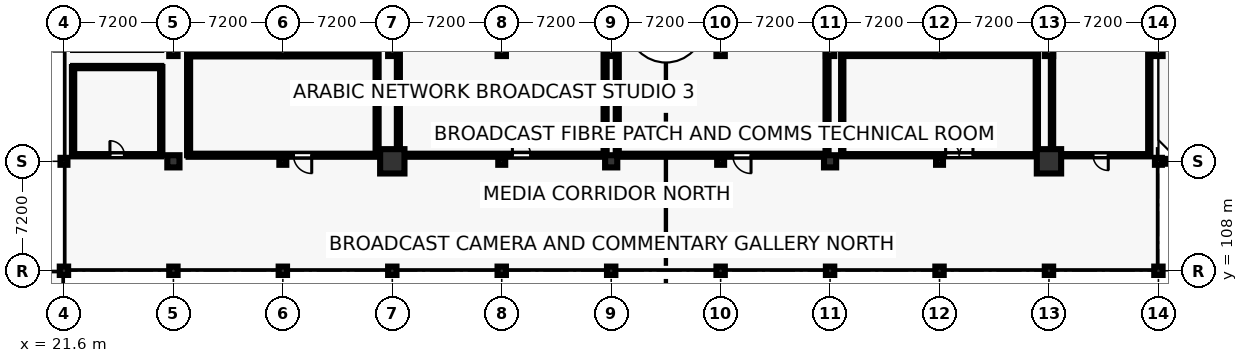
"""IFC4 building model, lengths in metres.
Left out: names, types, materials, properties, quantities, classifications, styles, units other than length and angle.
Written with IfcOpenShell. Run it as: python <this file> out.ifc"""

import sys

from ifc_helpers import new_model, si_unit, direction, frame, frame_2d, origin, origin_2d, place, context, subcontext, project, spatial, rectangle, circle, hollow_circle, extrude, element, fill, save


model = new_model("IFC4")
c1 = context("Model", 3, precision=1e-05, world=origin(), true_north=direction((0.0, 1.0)))
c2 = subcontext(c1, "Body", "Model", "MODEL_VIEW")
j1 = project(units=[si_unit("LENGTHUNIT", "METRE"), si_unit("PLANEANGLEUNIT", "RADIAN")], contexts=[c1])
p1 = place(None, origin())
s1 = spatial("IfcSite", under=j1, at=p1, CompositionType="ELEMENT")
p2 = place(p1, origin())
s2 = spatial("IfcBuilding", under=s1, at=p2, CompositionType="ELEMENT")
p3 = place(p2, frame((0.0, 0.0, 18.6)))
s3 = spatial("IfcBuildingStorey", under=s2, at=p3, CompositionType="ELEMENT", Elevation=18.6)
p4 = place(p3, frame((21.6, 108.0, 0.0), z_axis=(0.0, 0.0, 1.0), x_axis=(1.0, 0.0, 0.0)))
e1 = element("IfcColumn", 1, at=p4, inside=s3, PredefinedType="COLUMN", context=c2, shape_type="SweptSolid", body=[
    extrude(rectangle(XDim=0.55, YDim=0.55, at=origin_2d()), origin(), (0.0, 0.0, 1.0), 4.4),
])
p5 = place(p3, frame((21.6, 115.2, 0.0), z_axis=(0.0, 0.0, 1.0), x_axis=(1.0, 0.0, 0.0)))
e2 = element("IfcColumn", 2, at=p5, inside=s3, PredefinedType="COLUMN", context=c2, shape_type="SweptSolid", body=[
    extrude(hollow_circle(Radius=0.229, WallThickness=0.02, at=origin_2d()), origin(), (0.0, 0.0, 1.0), 4.4),
])
p6 = place(p3, frame((28.8, 108.0, 0.0), z_axis=(0.0, 0.0, 1.0), x_axis=(1.0, 0.0, 0.0)))
e3 = element("IfcColumn", 3, at=p6, inside=s3, PredefinedType="COLUMN", context=c2, shape_type="SweptSolid", body=[
    extrude(rectangle(XDim=0.55, YDim=0.55, at=origin_2d()), origin(), (0.0, 0.0, 1.0), 4.4),
])
p7 = place(p3, frame((28.8, 115.2, 0.0), z_axis=(0.0, 0.0, 1.0), x_axis=(1.0, 0.0, 0.0)))
e4 = element("IfcColumn", 4, at=p7, inside=s3, PredefinedType="COLUMN", context=c2, shape_type="SweptSolid", body=[
    extrude(circle(Radius=0.4, at=origin_2d()), origin(), (0.0, 0.0, 1.0), 4.4),
])
for number, where, z_axis, x_axis in (
    (5, (28.8, 122.4, 0.0), (0.0, 0.0, 1.0), (1.0, 0.0, 0.0)),
    (6, (36.0, 108.0, 0.0), (0.0, 0.0, 1.0), (1.0, 0.0, 0.0)),
):
    element("IfcColumn", number, at=place(p3, frame(where, z_axis=z_axis, x_axis=x_axis)), inside=s3, PredefinedType="COLUMN", context=c2, shape_type="SweptSolid", body=[
        extrude(rectangle(XDim=0.55, YDim=0.55, at=origin_2d()), origin(), (0.0, 0.0, 1.0), 4.4),
    ])
p8 = place(p3, frame((36.0, 115.2, 0.0), z_axis=(0.0, 0.0, 1.0), x_axis=(1.0, 0.0, 0.0)))
e7 = element("IfcColumn", 7, at=p8, inside=s3, PredefinedType="COLUMN", context=c2, shape_type="SweptSolid", body=[
    extrude(hollow_circle(Radius=0.229, WallThickness=0.02, at=origin_2d()), origin(), (0.0, 0.0, 1.0), 4.4),
])
for number, where, z_axis, x_axis in (
    (8, (36.0, 122.4, 0.0), (0.0, 0.0, 1.0), (1.0, 0.0, 0.0)),
    (9, (43.2, 108.0, 0.0), (0.0, 0.0, 1.0), (1.0, 0.0, 0.0)),
):
    element("IfcColumn", number, at=place(p3, frame(where, z_axis=z_axis, x_axis=x_axis)), inside=s3, PredefinedType="COLUMN", context=c2, shape_type="SweptSolid", body=[
        extrude(rectangle(XDim=0.55, YDim=0.55, at=origin_2d()), origin(), (0.0, 0.0, 1.0), 4.4),
    ])
p9 = place(p3, frame((43.2, 115.2, 0.0), z_axis=(0.0, 0.0, 1.0), x_axis=(1.0, 0.0, 0.0)))
e10 = element("IfcColumn", 10, at=p9, inside=s3, PredefinedType="COLUMN", context=c2, shape_type="SweptSolid", body=[
    extrude(circle(Radius=0.8, at=origin_2d()), origin(), (0.0, 0.0, 1.0), 4.4),
])
for number, where, z_axis, x_axis in (
    (11, (43.2, 122.4, 0.0), (0.0, 0.0, 1.0), (1.0, 0.0, 0.0)),
    (12, (50.4, 108.0, 0.0), (0.0, 0.0, 1.0), (1.0, 0.0, 0.0)),
):
    element("IfcColumn", number, at=place(p3, frame(where, z_axis=z_axis, x_axis=x_axis)), inside=s3, PredefinedType="COLUMN", context=c2, shape_type="SweptSolid", body=[
        extrude(rectangle(XDim=0.55, YDim=0.55, at=origin_2d()), origin(), (0.0, 0.0, 1.0), 4.4),
    ])
p10 = place(p3, frame((50.4, 115.2, 0.0), z_axis=(0.0, 0.0, 1.0), x_axis=(1.0, 0.0, 0.0)))
e13 = element("IfcColumn", 13, at=p10, inside=s3, PredefinedType="COLUMN", context=c2, shape_type="SweptSolid", body=[
    extrude(hollow_circle(Radius=0.229, WallThickness=0.02, at=origin_2d()), origin(), (0.0, 0.0, 1.0), 4.4),
])
for number, where, z_axis, x_axis in (
    (14, (50.4, 122.4, 0.0), (0.0, 0.0, 1.0), (1.0, 0.0, 0.0)),
    (15, (57.6, 108.0, 0.0), (0.0, 0.0, 1.0), (1.0, 0.0, 0.0)),
):
    element("IfcColumn", number, at=place(p3, frame(where, z_axis=z_axis, x_axis=x_axis)), inside=s3, PredefinedType="COLUMN", context=c2, shape_type="SweptSolid", body=[
        extrude(rectangle(XDim=0.55, YDim=0.55, at=origin_2d()), origin(), (0.0, 0.0, 1.0), 4.4),
    ])
p11 = place(p3, frame((57.6, 115.2, 0.0), z_axis=(0.0, 0.0, 1.0), x_axis=(1.0, 0.0, 0.0)))
e16 = element("IfcColumn", 16, at=p11, inside=s3, PredefinedType="COLUMN", context=c2, shape_type="SweptSolid", body=[
    extrude(circle(Radius=0.4, at=origin_2d()), origin(), (0.0, 0.0, 1.0), 4.4),
])
for number, where, z_axis, x_axis in (
    (17, (57.6, 122.4, 0.0), (0.0, 0.0, 1.0), (1.0, 0.0, 0.0)),
    (18, (64.8, 108.0, 0.0), (0.0, 0.0, 1.0), (1.0, 0.0, 0.0)),
):
    element("IfcColumn", number, at=place(p3, frame(where, z_axis=z_axis, x_axis=x_axis)), inside=s3, PredefinedType="COLUMN", context=c2, shape_type="SweptSolid", body=[
        extrude(rectangle(XDim=0.55, YDim=0.55, at=origin_2d()), origin(), (0.0, 0.0, 1.0), 4.4),
    ])
p12 = place(p3, frame((64.8, 115.2, 0.0), z_axis=(0.0, 0.0, 1.0), x_axis=(1.0, 0.0, 0.0)))
e19 = element("IfcColumn", 19, at=p12, inside=s3, PredefinedType="COLUMN", context=c2, shape_type="SweptSolid", body=[
    extrude(hollow_circle(Radius=0.229, WallThickness=0.02, at=origin_2d()), origin(), (0.0, 0.0, 1.0), 4.4),
])
for number, where, z_axis, x_axis in (
    (20, (64.8, 122.4, 0.0), (0.0, 0.0, 1.0), (1.0, 0.0, 0.0)),
    (21, (72.0, 108.0, 0.0), (0.0, 0.0, 1.0), (1.0, 0.0, 0.0)),
):
    element("IfcColumn", number, at=place(p3, frame(where, z_axis=z_axis, x_axis=x_axis)), inside=s3, PredefinedType="COLUMN", context=c2, shape_type="SweptSolid", body=[
        extrude(rectangle(XDim=0.55, YDim=0.55, at=origin_2d()), origin(), (0.0, 0.0, 1.0), 4.4),
    ])
p13 = place(p3, frame((72.0, 115.2, 0.0), z_axis=(0.0, 0.0, 1.0), x_axis=(1.0, 0.0, 0.0)))
e22 = element("IfcColumn", 22, at=p13, inside=s3, PredefinedType="COLUMN", context=c2, shape_type="SweptSolid", body=[
    extrude(circle(Radius=0.4, at=origin_2d()), origin(), (0.0, 0.0, 1.0), 4.4),
])
for number, where, z_axis, x_axis in (
    (23, (72.0, 122.4, 0.0), (0.0, 0.0, 1.0), (1.0, 0.0, 0.0)),
    (24, (79.2, 108.0, 0.0), (0.0, 0.0, 1.0), (1.0, 0.0, 0.0)),
):
    element("IfcColumn", number, at=place(p3, frame(where, z_axis=z_axis, x_axis=x_axis)), inside=s3, PredefinedType="COLUMN", context=c2, shape_type="SweptSolid", body=[
        extrude(rectangle(XDim=0.55, YDim=0.55, at=origin_2d()), origin(), (0.0, 0.0, 1.0), 4.4),
    ])
p14 = place(p3, frame((79.2, 115.2, 0.0), z_axis=(0.0, 0.0, 1.0), x_axis=(1.0, 0.0, 0.0)))
e25 = element("IfcColumn", 25, at=p14, inside=s3, PredefinedType="COLUMN", context=c2, shape_type="SweptSolid", body=[
    extrude(hollow_circle(Radius=0.229, WallThickness=0.02, at=origin_2d()), origin(), (0.0, 0.0, 1.0), 4.4),
])
for number, where, z_axis, x_axis in (
    (26, (79.2, 122.4, 0.0), (0.0, 0.0, 1.0), (1.0, 0.0, 0.0)),
    (27, (86.4, 108.0, 0.0), (0.0, 0.0, 1.0), (1.0, 0.0, 0.0)),
):
    element("IfcColumn", number, at=place(p3, frame(where, z_axis=z_axis, x_axis=x_axis)), inside=s3, PredefinedType="COLUMN", context=c2, shape_type="SweptSolid", body=[
        extrude(rectangle(XDim=0.55, YDim=0.55, at=origin_2d()), origin(), (0.0, 0.0, 1.0), 4.4),
    ])
p15 = place(p3, frame((86.4, 115.2, 0.0), z_axis=(0.0, 0.0, 1.0), x_axis=(1.0, 0.0, 0.0)))
e28 = element("IfcColumn", 28, at=p15, inside=s3, PredefinedType="COLUMN", context=c2, shape_type="SweptSolid", body=[
    extrude(circle(Radius=0.8, at=origin_2d()), origin(), (0.0, 0.0, 1.0), 4.4),
])
for number, where, z_axis, x_axis in (
    (29, (86.4, 122.4, 0.0), (0.0, 0.0, 1.0), (1.0, 0.0, 0.0)),
    (30, (93.6, 108.0, 0.0), (0.0, 0.0, 1.0), (1.0, 0.0, 0.0)),
):
    element("IfcColumn", number, at=place(p3, frame(where, z_axis=z_axis, x_axis=x_axis)), inside=s3, PredefinedType="COLUMN", context=c2, shape_type="SweptSolid", body=[
        extrude(rectangle(XDim=0.55, YDim=0.55, at=origin_2d()), origin(), (0.0, 0.0, 1.0), 4.4),
    ])
p16 = place(p3, frame((93.6, 115.2, 0.0), z_axis=(0.0, 0.0, 1.0), x_axis=(1.0, 0.0, 0.0)))
e31 = element("IfcColumn", 31, at=p16, inside=s3, PredefinedType="COLUMN", context=c2, shape_type="SweptSolid", body=[
    extrude(hollow_circle(Radius=0.229, WallThickness=0.02, at=origin_2d()), origin(), (0.0, 0.0, 1.0), 4.4),
])
p17 = place(p3, frame((93.6, 122.4, 0.0), z_axis=(0.0, 0.0, 1.0), x_axis=(1.0, 0.0, 0.0)))
e32 = element("IfcColumn", 32, at=p17, inside=s3, PredefinedType="COLUMN", context=c2, shape_type="SweptSolid", body=[
    extrude(rectangle(XDim=0.55, YDim=0.55, at=origin_2d()), origin(), (0.0, 0.0, 1.0), 4.4),
])
p18 = place(p3, frame((93.95, 115.2, 0.0), z_axis=(0.0, 0.0, 1.0), x_axis=(1.0, 0.0, 0.0)))
e33 = element("IfcWall", 33, at=p18, inside=s3, PredefinedType="SOLIDWALL", context=c2, shape_type="SweptSolid", body=[
    extrude(rectangle(XDim=13.7, YDim=0.32, at=frame_2d((6.85, 0.0))), origin(), (0.0, 0.0, 1.0), 3.21),
])
p19 = place(p3, frame((29.8, 115.6, 0.0), z_axis=(0.0, 0.0, 1.0), x_axis=(1.0, 0.0, 0.0)))
e34 = element("IfcWall", 34, at=p19, inside=s3, PredefinedType="PARTITIONING", context=c2, shape_type="SweptSolid", body=[
    extrude(rectangle(XDim=12.4, YDim=0.2, at=frame_2d((6.2, 0.0))), origin(), (0.0, 0.0, 1.0), 3.21),
])
p20 = place(p19, frame((6.9, 0.0, 0.0)))
e35 = element("IfcOpeningElement", 35, at=p20, cuts=e34, PredefinedType="OPENING", context=c2, shape_type="SweptSolid", body=[
    extrude(rectangle(XDim=1.2, YDim=2.25, at=frame_2d((0.6, 1.125))), frame((0.0, 0.11, 0.0), z_axis=(0.0, -1.0, 0.0), x_axis=(1.0, 0.0, 0.0)), (0.0, 0.0, 1.0), 0.22),
])
p21 = place(p3, frame((42.2, 115.6, 0.0), z_axis=(0.0, 0.0, 1.0), x_axis=(0.0, 1.0, 0.0)))
e36 = element("IfcWall", 36, at=p21, inside=s3, PredefinedType="PARTITIONING", context=c2, shape_type="SweptSolid", body=[
    extrude(rectangle(XDim=6.6, YDim=0.2, at=frame_2d((3.3, 0.0))), origin(), (0.0, 0.0, 1.0), 3.21),
])
p22 = place(p3, frame((42.2, 122.2, 0.0), z_axis=(0.0, 0.0, 1.0), x_axis=(-1.0, 0.0, 0.0)))
e37 = element("IfcWall", 37, at=p22, inside=s3, PredefinedType="PARTITIONING", context=c2, shape_type="SweptSolid", body=[
    extrude(rectangle(XDim=12.4, YDim=0.2, at=frame_2d((6.2, 0.0))), origin(), (0.0, 0.0, 1.0), 3.21),
])
p23 = place(p3, frame((29.8, 122.2, 0.0), z_axis=(0.0, 0.0, 1.0), x_axis=(0.0, -1.0, 0.0)))
e38 = element("IfcWall", 38, at=p23, inside=s3, PredefinedType="PARTITIONING", context=c2, shape_type="SweptSolid", body=[
    extrude(rectangle(XDim=6.6, YDim=0.2, at=frame_2d((3.3, 0.0))), origin(), (0.0, 0.0, 1.0), 3.21),
])
p24 = place(p3, frame((43.6, 115.6, 0.0), z_axis=(0.0, 0.0, 1.0), x_axis=(1.0, 0.0, 0.0)))
e39 = element("IfcWall", 39, at=p24, inside=s3, PredefinedType="PARTITIONING", context=c2, shape_type="SweptSolid", body=[
    extrude(rectangle(XDim=13.6, YDim=0.2, at=frame_2d((6.8, 0.0))), origin(), (0.0, 0.0, 1.0), 3.21),
])
p25 = place(p24, frame((7.5, 0.0, 0.0)))
e40 = element("IfcOpeningElement", 40, at=p25, cuts=e39, PredefinedType="OPENING", context=c2, shape_type="SweptSolid", body=[
    extrude(rectangle(XDim=1.2, YDim=2.25, at=frame_2d((0.6, 1.125))), frame((0.0, 0.11, 0.0), z_axis=(0.0, -1.0, 0.0), x_axis=(1.0, 0.0, 0.0)), (0.0, 0.0, 1.0), 0.22),
])
for number, where, z_axis, x_axis in (
    (41, (57.2, 115.6, 0.0), (0.0, 0.0, 1.0), (0.0, 1.0, 0.0)),
    (42, (43.6, 128.6, 0.0), (0.0, 0.0, 1.0), (0.0, -1.0, 0.0)),
):
    element("IfcWall", number, at=place(p3, frame(where, z_axis=z_axis, x_axis=x_axis)), inside=s3, PredefinedType="PARTITIONING", context=c2, shape_type="SweptSolid", body=[
        extrude(rectangle(XDim=13.0, YDim=0.2, at=frame_2d((6.5, 0.0))), origin(), (0.0, 0.0, 1.0), 3.21),
    ])
p26 = place(p3, frame((58.0, 115.6, 0.0), z_axis=(0.0, 0.0, 1.0), x_axis=(1.0, 0.0, 0.0)))
e43 = element("IfcWall", 43, at=p26, inside=s3, PredefinedType="PARTITIONING", context=c2, shape_type="SweptSolid", body=[
    extrude(rectangle(XDim=13.8, YDim=0.2, at=frame_2d((6.9, 0.0))), origin(), (0.0, 0.0, 1.0), 3.21),
])
p27 = place(p26, frame((7.6, 0.0, 0.0)))
e44 = element("IfcOpeningElement", 44, at=p27, cuts=e43, PredefinedType="OPENING", context=c2, shape_type="SweptSolid", body=[
    extrude(rectangle(XDim=1.2, YDim=2.25, at=frame_2d((0.6, 1.125))), frame((0.0, 0.11, 0.0), z_axis=(0.0, -1.0, 0.0), x_axis=(1.0, 0.0, 0.0)), (0.0, 0.0, 1.0), 0.22),
])
for number, where, z_axis, x_axis in (
    (45, (71.8, 115.6, 0.0), (0.0, 0.0, 1.0), (0.0, 1.0, 0.0)),
    (46, (58.0, 128.6, 0.0), (0.0, 0.0, 1.0), (0.0, -1.0, 0.0)),
):
    element("IfcWall", number, at=place(p3, frame(where, z_axis=z_axis, x_axis=x_axis)), inside=s3, PredefinedType="PARTITIONING", context=c2, shape_type="SweptSolid", body=[
        extrude(rectangle(XDim=13.0, YDim=0.2, at=frame_2d((6.5, 0.0))), origin(), (0.0, 0.0, 1.0), 3.21),
    ])
p28 = place(p3, frame((72.8, 115.6, 0.0), z_axis=(0.0, 0.0, 1.0), x_axis=(1.0, 0.0, 0.0)))
e47 = element("IfcWall", 47, at=p28, inside=s3, PredefinedType="PARTITIONING", context=c2, shape_type="SweptSolid", body=[
    extrude(rectangle(XDim=12.8, YDim=0.15, at=frame_2d((6.4, 0.0))), origin(), (0.0, 0.0, 1.0), 3.21),
])
p29 = place(p28, frame((6.8, 0.0, 0.0)))
e48 = element("IfcOpeningElement", 48, at=p29, cuts=e47, PredefinedType="OPENING", context=c2, shape_type="SweptSolid", body=[
    extrude(rectangle(XDim=1.8, YDim=2.3, at=frame_2d((0.9, 1.15))), frame((0.0, 0.085, 0.0), z_axis=(0.0, -1.0, 0.0), x_axis=(1.0, 0.0, 0.0)), (0.0, 0.0, 1.0), 0.17),
])
p30 = place(p3, frame((85.6, 115.6, 0.0), z_axis=(0.0, 0.0, 1.0), x_axis=(0.0, 1.0, 0.0)))
e49 = element("IfcWall", 49, at=p30, inside=s3, PredefinedType="PARTITIONING", context=c2, shape_type="SweptSolid", body=[
    extrude(rectangle(XDim=6.6, YDim=0.15, at=frame_2d((3.3, 0.0))), origin(), (0.0, 0.0, 1.0), 3.21),
])
p31 = place(p3, frame((85.6, 122.2, 0.0), z_axis=(0.0, 0.0, 1.0), x_axis=(-1.0, 0.0, 0.0)))
e50 = element("IfcWall", 50, at=p31, inside=s3, PredefinedType="PARTITIONING", context=c2, shape_type="SweptSolid", body=[
    extrude(rectangle(XDim=12.8, YDim=0.15, at=frame_2d((6.4, 0.0))), origin(), (0.0, 0.0, 1.0), 3.21),
])
p32 = place(p3, frame((72.8, 122.2, 0.0), z_axis=(0.0, 0.0, 1.0), x_axis=(0.0, -1.0, 0.0)))
e51 = element("IfcWall", 51, at=p32, inside=s3, PredefinedType="PARTITIONING", context=c2, shape_type="SweptSolid", body=[
    extrude(rectangle(XDim=6.6, YDim=0.15, at=frame_2d((3.3, 0.0))), origin(), (0.0, 0.0, 1.0), 3.21),
])
p33 = place(p3, frame((86.6, 115.6, 0.0), z_axis=(0.0, 0.0, 1.0), x_axis=(1.0, 0.0, 0.0)))
e52 = element("IfcWall", 52, at=p33, inside=s3, PredefinedType="PARTITIONING", context=c2, shape_type="SweptSolid", body=[
    extrude(rectangle(XDim=6.4, YDim=0.15, at=frame_2d((3.2, 0.0))), origin(), (0.0, 0.0, 1.0), 3.21),
])
p34 = place(p33, frame((2.7, 0.0, 0.0)))
e53 = element("IfcOpeningElement", 53, at=p34, cuts=e52, PredefinedType="OPENING", context=c2, shape_type="SweptSolid", body=[
    extrude(rectangle(XDim=1.0, YDim=2.2, at=frame_2d((0.5, 1.1))), frame((0.0, 0.085, 0.0), z_axis=(0.0, -1.0, 0.0), x_axis=(1.0, 0.0, 0.0)), (0.0, 0.0, 1.0), 0.17),
])
for number, where, z_axis, x_axis in (
    (54, (93.0, 115.6, 0.0), (0.0, 0.0, 1.0), (0.0, 1.0, 0.0)),
    (55, (86.6, 128.6, 0.0), (0.0, 0.0, 1.0), (0.0, -1.0, 0.0)),
):
    element("IfcWall", number, at=place(p3, frame(where, z_axis=z_axis, x_axis=x_axis)), inside=s3, PredefinedType="PARTITIONING", context=c2, shape_type="SweptSolid", body=[
        extrude(rectangle(XDim=13.0, YDim=0.15, at=frame_2d((6.5, 0.0))), origin(), (0.0, 0.0, 1.0), 3.21),
    ])
p35 = place(p3, frame((22.2, 115.6, 0.0), z_axis=(0.0, 0.0, 1.0), x_axis=(1.0, 0.0, 0.0)))
e56 = element("IfcWall", 56, at=p35, inside=s3, PredefinedType="PARTITIONING", context=c2, shape_type="SweptSolid", body=[
    extrude(rectangle(XDim=5.8, YDim=0.15, at=frame_2d((2.9, 0.0))), origin(), (0.0, 0.0, 1.0), 3.21),
])
p36 = place(p35, frame((2.425, 0.0, 0.0)))
e57 = element("IfcOpeningElement", 57, at=p36, cuts=e56, PredefinedType="OPENING", context=c2, shape_type="SweptSolid", body=[
    extrude(rectangle(XDim=0.95, YDim=2.15, at=frame_2d((0.475, 1.075))), frame((0.0, 0.085, 0.0), z_axis=(0.0, -1.0, 0.0), x_axis=(1.0, 0.0, 0.0)), (0.0, 0.0, 1.0), 0.17),
])
p37 = place(p3, frame((28.0, 115.6, 0.0), z_axis=(0.0, 0.0, 1.0), x_axis=(0.0, 1.0, 0.0)))
e58 = element("IfcWall", 58, at=p37, inside=s3, PredefinedType="PARTITIONING", context=c2, shape_type="SweptSolid", body=[
    extrude(rectangle(XDim=5.8, YDim=0.15, at=frame_2d((2.9, 0.0))), origin(), (0.0, 0.0, 1.0), 3.21),
])
p38 = place(p3, frame((28.0, 121.4, 0.0), z_axis=(0.0, 0.0, 1.0), x_axis=(-1.0, 0.0, 0.0)))
e59 = element("IfcWall", 59, at=p38, inside=s3, PredefinedType="PARTITIONING", context=c2, shape_type="SweptSolid", body=[
    extrude(rectangle(XDim=5.8, YDim=0.15, at=frame_2d((2.9, 0.0))), origin(), (0.0, 0.0, 1.0), 3.21),
])
p39 = place(p3, frame((22.2, 121.4, 0.0), z_axis=(0.0, 0.0, 1.0), x_axis=(0.0, -1.0, 0.0)))
e60 = element("IfcWall", 60, at=p39, inside=s3, PredefinedType="PARTITIONING", context=c2, shape_type="SweptSolid", body=[
    extrude(rectangle(XDim=5.8, YDim=0.15, at=frame_2d((2.9, 0.0))), origin(), (0.0, 0.0, 1.0), 3.21),
])
p40 = place(p20, frame((1.2, 0.0, 0.0), z_axis=(0.0, 0.0, 1.0), x_axis=(-1.0, 0.0, 0.0)))
e61 = element("IfcDoor", 61, at=p40, inside=s3, OperationType="SINGLE_SWING_RIGHT", PredefinedType="DOOR", context=c2, shape_type="SweptSolid", body=[
    extrude(rectangle(XDim=1.2, YDim=2.25, at=frame_2d((0.6, 1.125))), frame((0.0, 0.025, 0.0), z_axis=(0.0, -1.0, 0.0), x_axis=(1.0, 0.0, 0.0)), (0.0, 0.0, 1.0), 0.05),
])
fill(e35, e61)
p41 = place(p25, origin())
e62 = element("IfcDoor", 62, at=p41, inside=s3, OperationType="SINGLE_SWING_LEFT", PredefinedType="DOOR", context=c2, shape_type="SweptSolid", body=[
    extrude(rectangle(XDim=1.2, YDim=2.25, at=frame_2d((0.6, 1.125))), frame((0.0, 0.025, 0.0), z_axis=(0.0, -1.0, 0.0), x_axis=(1.0, 0.0, 0.0)), (0.0, 0.0, 1.0), 0.05),
])
fill(e40, e62)
p42 = place(p27, frame((1.2, 0.0, 0.0), z_axis=(0.0, 0.0, 1.0), x_axis=(-1.0, 0.0, 0.0)))
e63 = element("IfcDoor", 63, at=p42, inside=s3, OperationType="SINGLE_SWING_RIGHT", PredefinedType="DOOR", context=c2, shape_type="SweptSolid", body=[
    extrude(rectangle(XDim=1.2, YDim=2.25, at=frame_2d((0.6, 1.125))), frame((0.0, 0.025, 0.0), z_axis=(0.0, -1.0, 0.0), x_axis=(1.0, 0.0, 0.0)), (0.0, 0.0, 1.0), 0.05),
])
fill(e44, e63)
p43 = place(p29, origin())
e64 = element("IfcDoor", 64, at=p43, inside=s3, OperationType="DOUBLE_DOOR_SINGLE_SWING", PredefinedType="DOOR", context=c2, shape_type="SweptSolid", body=[
    extrude(rectangle(XDim=1.8, YDim=2.3, at=frame_2d((0.9, 1.15))), frame((0.0, 0.025, 0.0), z_axis=(0.0, -1.0, 0.0), x_axis=(1.0, 0.0, 0.0)), (0.0, 0.0, 1.0), 0.05),
])
fill(e48, e64)
p44 = place(p34, frame((1.0, 0.0, 0.0), z_axis=(0.0, 0.0, 1.0), x_axis=(-1.0, 0.0, 0.0)))
e65 = element("IfcDoor", 65, at=p44, inside=s3, OperationType="SINGLE_SWING_RIGHT", PredefinedType="DOOR", context=c2, shape_type="SweptSolid", body=[
    extrude(rectangle(XDim=1.0, YDim=2.2, at=frame_2d((0.5, 1.1))), frame((0.0, 0.025, 0.0), z_axis=(0.0, -1.0, 0.0), x_axis=(1.0, 0.0, 0.0)), (0.0, 0.0, 1.0), 0.05),
])
fill(e53, e65)
p45 = place(p36, origin())
e66 = element("IfcDoor", 66, at=p45, inside=s3, OperationType="SINGLE_SWING_LEFT", PredefinedType="DOOR", context=c2, shape_type="SweptSolid", body=[
    extrude(rectangle(XDim=0.95, YDim=2.15, at=frame_2d((0.475, 1.075))), frame((0.0, 0.025, 0.0), z_axis=(0.0, -1.0, 0.0), x_axis=(1.0, 0.0, 0.0)), (0.0, 0.0, 1.0), 0.05),
])
fill(e57, e66)
save(model, sys.argv[1])
